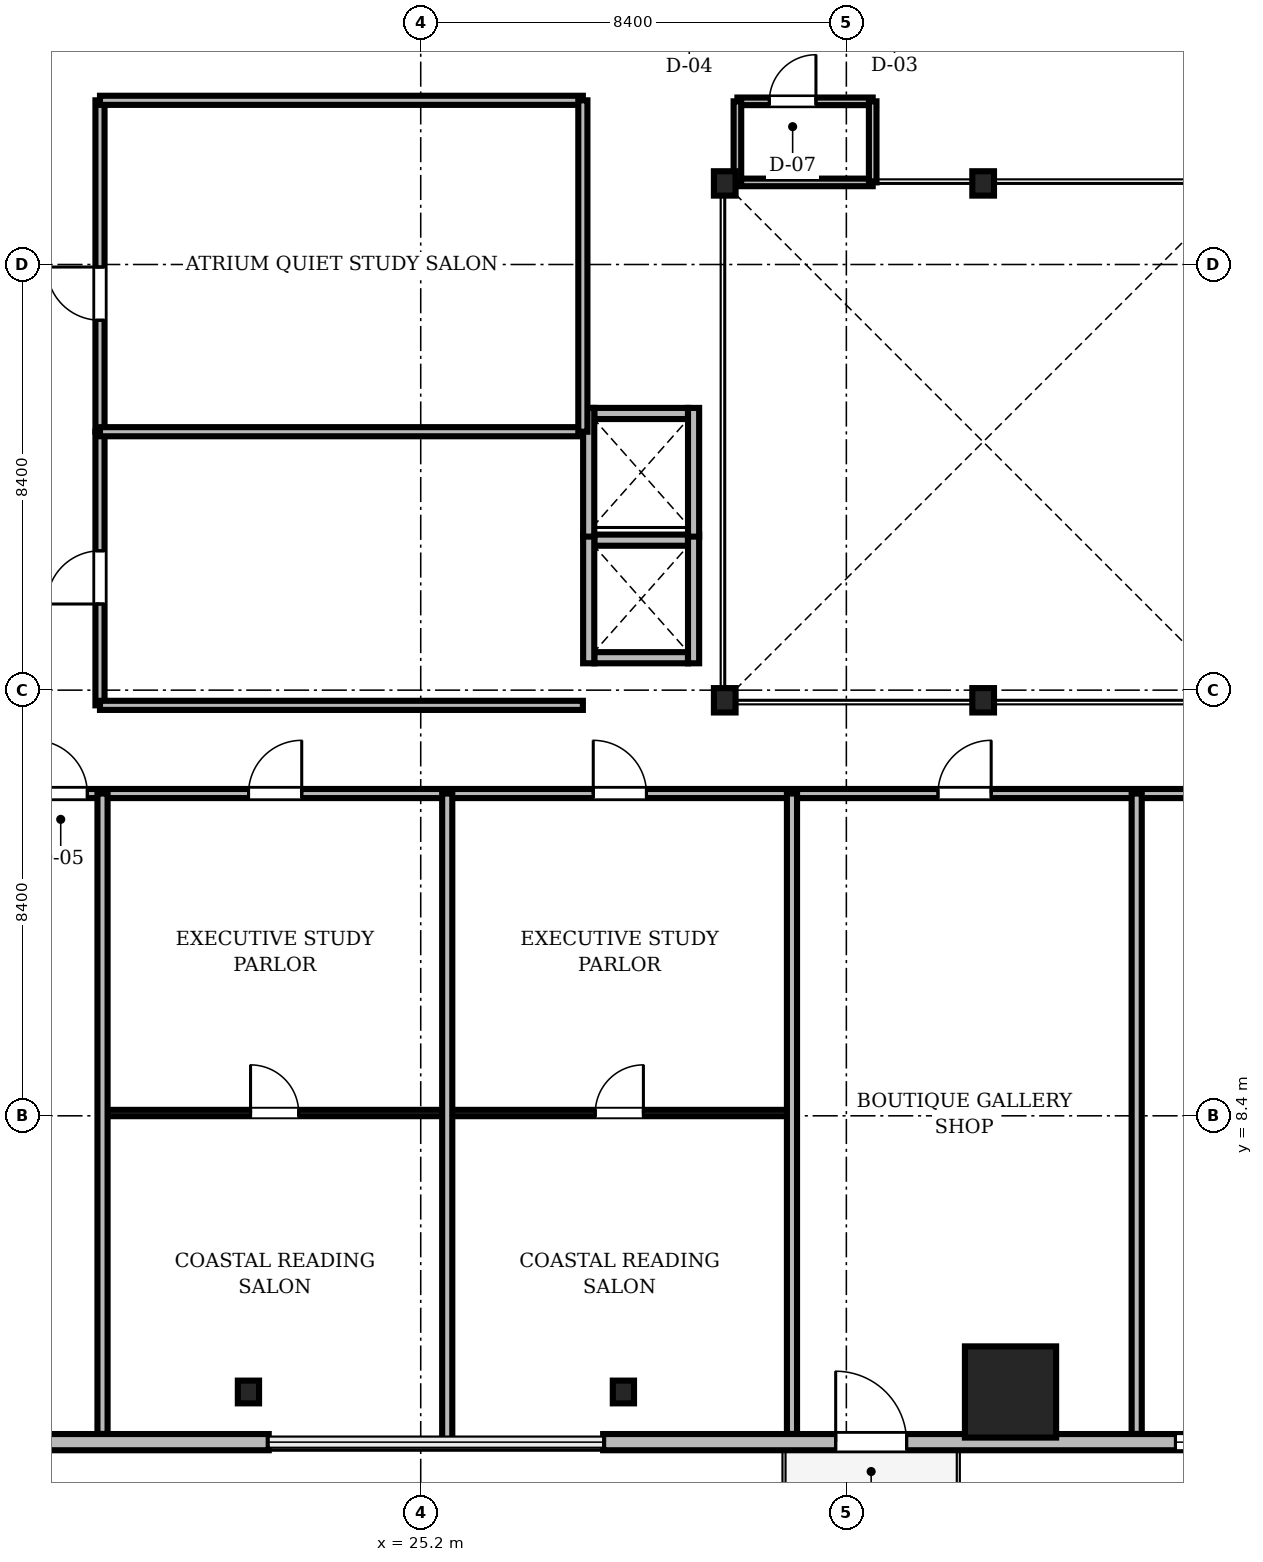
"""IFC4 building model, lengths in metres.
Left out: names, types, materials, properties, quantities, classifications, styles, units other than length and angle.
Written with IfcOpenShell. Run it as: python <this file> out.ifc"""

import sys

from ifc_helpers import new_model, si_unit, direction, frame, frame_2d, origin, origin_2d, place, context, subcontext, project, spatial, rectangle, i_section, extrude, source, transform, mapped, element, fill, save


model = new_model("IFC4")
c1 = context("Model", 3, precision=1e-05, world=origin(), true_north=direction((0.0, 1.0)))
c2 = subcontext(c1, "Body", "Model", "MODEL_VIEW")
j1 = project(units=[si_unit("LENGTHUNIT", "METRE"), si_unit("PLANEANGLEUNIT", "RADIAN")], contexts=[c1])
p1 = place(None, origin())
s1 = spatial("IfcSite", under=j1, at=p1, CompositionType="ELEMENT")
p2 = place(p1, origin())
s2 = spatial("IfcBuilding", under=s1, at=p2, CompositionType="ELEMENT")
p3 = place(p2, frame((0.0, 0.0, 75.05)))
s3 = spatial("IfcBuildingStorey", under=s2, at=p3, CompositionType="ELEMENT", Elevation=75.05)
m1 = source(origin(), c2, "Body", "SweptSolid", [
    extrude(i_section(OverallWidth=0.428, OverallDepth=0.481, WebThickness=0.04, FlangeThickness=0.063, FilletRadius=0.015, at=origin_2d()), origin(), (0.0, 0.0, 1.0), 3.41),
])
for number, where, z_axis, x_axis in (
    (1, (31.2, 16.6, 0.0), (0.0, 0.0, 1.0), (1.0, 0.0, 0.0)),
    (2, (36.3, 16.6, 0.0), (0.0, 0.0, 1.0), (1.0, 0.0, 0.0)),
    (3, (36.3, 26.8, 0.0), (0.0, 0.0, 1.0), (1.0, 0.0, 0.0)),
    (4, (31.2, 26.8, 0.0), (0.0, 0.0, 1.0), (1.0, 0.0, 0.0)),
):
    element("IfcColumn", number, at=place(p3, frame(where, z_axis=z_axis, x_axis=x_axis)), inside=s3, PredefinedType="COLUMN", context=c2, shape_type="MappedRepresentation", body=[
        mapped(m1, transform((0.0, 0.0, 0.0), scale=1.0)),
    ])
m2 = source(origin(), c2, "Body", "SweptSolid", [
    extrude(rectangle(XDim=1.8, YDim=1.8, at=origin_2d()), origin(), (0.0, 0.0, 1.0), 3.41),
])
p4 = place(p3, frame((36.84, 2.95, 0.0), z_axis=(0.0, 0.0, 1.0), x_axis=(1.0, 0.0, 0.0)))
e5 = element("IfcColumn", 5, at=p4, inside=s3, PredefinedType="COLUMN", context=c2, shape_type="MappedRepresentation", body=[
    mapped(m2, transform((0.0, 0.0, 0.0), scale=1.0)),
])
m3 = source(origin(), c2, "Body", "SweptSolid", [
    extrude(i_section(OverallWidth=0.419, OverallDepth=0.449, WebThickness=0.031, FlangeThickness=0.048, FilletRadius=0.015, at=origin_2d()), origin(), (0.0, 0.0, 1.0), 3.41),
])
for number, where, z_axis, x_axis in (
    (6, (21.8, 2.95, 0.0), (0.0, 0.0, 1.0), (1.0, 0.0, 0.0)),
    (7, (29.2, 2.95, 0.0), (0.0, 0.0, 1.0), (1.0, 0.0, 0.0)),
):
    element("IfcColumn", number, at=place(p3, frame(where, z_axis=z_axis, x_axis=x_axis)), inside=s3, PredefinedType="COLUMN", context=c2, shape_type="MappedRepresentation", body=[
        mapped(m3, transform((0.0, 0.0, 0.0), scale=1.0)),
    ])
m4 = source(origin(), c2, "Body", "SweptSolid", [
    extrude(rectangle(XDim=15.6, YDim=0.32, at=frame_2d((7.8, 0.0))), origin(), (0.0, 0.0, 1.0), 3.41),
])
p5 = place(p3, frame((6.6, 1.96, 0.0), z_axis=(0.0, 0.0, 1.0), x_axis=(1.0, 0.0, 0.0)))
e8 = element("IfcWall", 8, at=p5, inside=s3, PredefinedType="SOLIDWALL", context=c2, shape_type="MappedRepresentation", body=[
    mapped(m4, transform((0.0, 0.0, 0.0), scale=1.0)),
])
m5 = source(origin(), c2, "Body", "SweptSolid", [
    extrude(rectangle(XDim=2.2, YDim=2.4, at=frame_2d((1.1, 1.2))), frame((0.0, 0.17, 0.0), z_axis=(0.0, -1.0, 0.0), x_axis=(1.0, 0.0, 0.0)), (0.0, 0.0, 1.0), 0.34),
])
p6 = place(p5, frame((3.005, 0.0, 0.72)))
e9 = element("IfcOpeningElement", 9, at=p6, cuts=e8, PredefinedType="OPENING", context=c2, shape_type="MappedRepresentation", body=[
    mapped(m5, transform((0.0, 0.0, 0.0), scale=1.0)),
])
p7 = place(p3, frame((28.8, 1.96, 0.0), z_axis=(0.0, 0.0, 1.0), x_axis=(1.0, 0.0, 0.0)))
e10 = element("IfcWall", 10, at=p7, inside=s3, PredefinedType="SOLIDWALL", context=c2, shape_type="MappedRepresentation", body=[
    mapped(m4, transform((0.0, 0.0, 0.0), scale=1.0)),
])
m6 = source(origin(), c2, "Body", "SweptSolid", [
    extrude(rectangle(XDim=1.4, YDim=2.3, at=frame_2d((0.7, 1.15))), frame((0.0, 0.17, 0.0), z_axis=(0.0, -1.0, 0.0), x_axis=(1.0, 0.0, 0.0)), (0.0, 0.0, 1.0), 0.34),
])
p8 = place(p7, frame((4.59, 0.0, 0.0)))
e11 = element("IfcOpeningElement", 11, at=p8, cuts=e10, PredefinedType="OPENING", context=c2, shape_type="MappedRepresentation", body=[
    mapped(m6, transform((0.0, 0.0, 0.0), scale=1.0)),
])
p9 = place(p7, frame((11.295, 0.0, 0.72)))
e12 = element("IfcOpeningElement", 12, at=p9, cuts=e10, PredefinedType="OPENING", context=c2, shape_type="MappedRepresentation", body=[
    mapped(m5, transform((0.0, 0.0, 0.0), scale=1.0)),
])
m7 = source(origin(), c2, "Body", "SweptSolid", [
    extrude(rectangle(XDim=1.85, YDim=0.22, at=frame_2d((0.925, 0.0))), origin(), (0.0, 0.0, 1.0), 3.41),
])
for number, where, z_axis, x_axis in (
    (13, (28.625, 17.44, 0.0), (0.0, 0.0, 1.0), (1.0, 0.0, 0.0)),
    (14, (28.625, 19.76, 0.0), (0.0, 0.0, 1.0), (1.0, 0.0, 0.0)),
):
    element("IfcWall", number, at=place(p3, frame(where, z_axis=z_axis, x_axis=x_axis)), inside=s3, PredefinedType="SOLIDWALL", context=c2, shape_type="MappedRepresentation", body=[
        mapped(m7, transform((0.0, 0.0, 0.0), scale=1.0)),
    ])
m8 = source(origin(), c2, "Body", "SweptSolid", [
    extrude(rectangle(XDim=2.54, YDim=0.22, at=frame_2d((1.27, 0.0))), origin(), (0.0, 0.0, 1.0), 3.41),
])
for number, where, z_axis, x_axis in (
    (15, (28.515, 17.33, 0.0), (0.0, 0.0, 1.0), (0.0, 1.0, 0.0)),
    (16, (30.585, 17.33, 0.0), (0.0, 0.0, 1.0), (0.0, 1.0, 0.0)),
):
    element("IfcWall", number, at=place(p3, frame(where, z_axis=z_axis, x_axis=x_axis)), inside=s3, PredefinedType="SOLIDWALL", context=c2, shape_type="MappedRepresentation", body=[
        mapped(m8, transform((0.0, 0.0, 0.0), scale=1.0)),
    ])
p10 = place(p3, frame((28.625, 22.26, 0.0), z_axis=(0.0, 0.0, 1.0), x_axis=(1.0, 0.0, 0.0)))
e17 = element("IfcWall", 17, at=p10, inside=s3, PredefinedType="SOLIDWALL", context=c2, shape_type="MappedRepresentation", body=[
    mapped(m7, transform((0.0, 0.0, 0.0), scale=1.0)),
])
for number, where, z_axis, x_axis in (
    (18, (28.515, 19.83, 0.0), (0.0, 0.0, 1.0), (0.0, 1.0, 0.0)),
    (19, (30.585, 19.83, 0.0), (0.0, 0.0, 1.0), (0.0, 1.0, 0.0)),
):
    element("IfcWall", number, at=place(p3, frame(where, z_axis=z_axis, x_axis=x_axis)), inside=s3, PredefinedType="SOLIDWALL", context=c2, shape_type="MappedRepresentation", body=[
        mapped(m8, transform((0.0, 0.0, 0.0), scale=1.0)),
    ])
m9 = source(origin(), c2, "Body", "SweptSolid", [
    extrude(rectangle(XDim=46.156, YDim=0.18, at=frame_2d((23.078, 0.0))), origin(), (0.0, 0.0, 1.0), 2.652),
])
p11 = place(p3, frame((2.422, 14.76, 0.0), z_axis=(0.0, 0.0, 1.0), x_axis=(1.0, 0.0, 0.0)))
e20 = element("IfcWall", 20, at=p11, inside=s3, PredefinedType="PARTITIONING", context=c2, shape_type="MappedRepresentation", body=[
    mapped(m9, transform((0.0, 0.0, 0.0), scale=1.0)),
])
m10 = source(origin(), c2, "Body", "SweptSolid", [
    extrude(rectangle(XDim=1.05, YDim=2.2, at=frame_2d((0.525, 1.1))), frame((0.0, 0.1, 0.0), z_axis=(0.0, -1.0, 0.0), x_axis=(1.0, 0.0, 0.0)), (0.0, 0.0, 1.0), 0.2),
])
p12 = place(p11, frame((15.148, 0.0, 0.0)))
e21 = element("IfcOpeningElement", 21, at=p12, cuts=e20, PredefinedType="OPENING", context=c2, shape_type="MappedRepresentation", body=[
    mapped(m10, transform((0.0, 0.0, 0.0), scale=1.0)),
])
p13 = place(p11, frame((19.38, 0.0, 0.0)))
e22 = element("IfcOpeningElement", 22, at=p13, cuts=e20, PredefinedType="OPENING", context=c2, shape_type="MappedRepresentation", body=[
    mapped(m10, transform((0.0, 0.0, 0.0), scale=1.0)),
])
p14 = place(p11, frame((26.183, 0.0, 0.0)))
e23 = element("IfcOpeningElement", 23, at=p14, cuts=e20, PredefinedType="OPENING", context=c2, shape_type="MappedRepresentation", body=[
    mapped(m10, transform((0.0, 0.0, 0.0), scale=1.0)),
])
p15 = place(p11, frame((32.986, 0.0, 0.0)))
e24 = element("IfcOpeningElement", 24, at=p15, cuts=e20, PredefinedType="OPENING", context=c2, shape_type="MappedRepresentation", body=[
    mapped(m10, transform((0.0, 0.0, 0.0), scale=1.0)),
])
p16 = place(p11, frame((40.998, 0.0, 0.0)))
e25 = element("IfcOpeningElement", 25, at=p16, cuts=e20, PredefinedType="OPENING", context=c2, shape_type="MappedRepresentation", body=[
    mapped(m10, transform((0.0, 0.0, 0.0), scale=1.0)),
])
m11 = source(origin(), c2, "Body", "SweptSolid", [
    extrude(rectangle(XDim=6.804, YDim=0.125, at=frame_2d((3.402, 0.0))), origin(), (0.0, 0.0, 1.0), 2.802),
])
p17 = place(p3, frame((25.723, 8.455, 0.0), z_axis=(0.0, 0.0, 1.0), x_axis=(1.0, 0.0, 0.0)))
e26 = element("IfcWall", 26, at=p17, inside=s3, PredefinedType="PARTITIONING", context=c2, shape_type="MappedRepresentation", body=[
    mapped(m11, transform((0.0, 0.0, 0.0), scale=1.0)),
])
m12 = source(origin(), c2, "Body", "SweptSolid", [
    extrude(rectangle(XDim=0.95, YDim=2.15, at=frame_2d((0.475, 1.075))), frame((0.0, 0.073, 0.0), z_axis=(0.0, -1.0, 0.0), x_axis=(1.0, 0.0, 0.0)), (0.0, 0.0, 1.0), 0.145),
])
p18 = place(p17, frame((2.922, 0.0, 0.0)))
e27 = element("IfcOpeningElement", 27, at=p18, cuts=e26, PredefinedType="OPENING", context=c2, shape_type="MappedRepresentation", body=[
    mapped(m12, transform((0.0, 0.0, 0.0), scale=1.0)),
])
m13 = source(origin(), c2, "Body", "SweptSolid", [
    extrude(rectangle(XDim=6.803, YDim=0.125, at=frame_2d((3.401, 0.0))), origin(), (0.0, 0.0, 1.0), 2.802),
])
p19 = place(p3, frame((18.92, 8.455, 0.0), z_axis=(0.0, 0.0, 1.0), x_axis=(1.0, 0.0, 0.0)))
e28 = element("IfcWall", 28, at=p19, inside=s3, PredefinedType="PARTITIONING", context=c2, shape_type="MappedRepresentation", body=[
    mapped(m13, transform((0.0, 0.0, 0.0), scale=1.0)),
])
p20 = place(p19, frame((2.922, 0.0, 0.0)))
e29 = element("IfcOpeningElement", 29, at=p20, cuts=e28, PredefinedType="OPENING", context=c2, shape_type="MappedRepresentation", body=[
    mapped(m12, transform((0.0, 0.0, 0.0), scale=1.0)),
])
m14 = source(origin(), c2, "Body", "SweptSolid", [
    extrude(rectangle(XDim=6.54, YDim=0.18, at=frame_2d((3.27, 0.0))), origin(), (0.0, 0.0, 1.0), 2.802),
])
p21 = place(p3, frame((18.87, 21.9, 0.0), z_axis=(0.0, 0.0, 1.0), x_axis=(0.0, 1.0, 0.0)))
e30 = element("IfcWall", 30, at=p21, inside=s3, PredefinedType="PARTITIONING", context=c2, shape_type="MappedRepresentation", body=[
    mapped(m14, transform((0.0, 0.0, 0.0), scale=1.0)),
])
p22 = place(p21, frame((2.2, 0.0, 0.0)))
e31 = element("IfcOpeningElement", 31, at=p22, cuts=e30, PredefinedType="OPENING", context=c2, shape_type="MappedRepresentation", body=[
    mapped(m10, transform((0.0, 0.0, 0.0), scale=1.0)),
])
m15 = source(origin(), c2, "Body", "SweptSolid", [
    extrude(rectangle(XDim=5.4, YDim=0.18, at=frame_2d((2.7, 0.0))), origin(), (0.0, 0.0, 1.0), 2.802),
])
p23 = place(p3, frame((18.87, 16.5, 0.0), z_axis=(0.0, 0.0, 1.0), x_axis=(0.0, 1.0, 0.0)))
e32 = element("IfcWall", 32, at=p23, inside=s3, PredefinedType="PARTITIONING", context=c2, shape_type="MappedRepresentation", body=[
    mapped(m15, transform((0.0, 0.0, 0.0), scale=1.0)),
])
p24 = place(p23, frame((2.0, 0.0, 0.0)))
e33 = element("IfcOpeningElement", 33, at=p24, cuts=e32, PredefinedType="OPENING", context=c2, shape_type="MappedRepresentation", body=[
    mapped(m10, transform((0.0, 0.0, 0.0), scale=1.0)),
])
m16 = source(origin(), c2, "Body", "SweptSolid", [
    extrude(rectangle(XDim=2.67, YDim=0.15, at=frame_2d((1.335, 0.0))), origin(), (0.0, 0.0, 1.0), 3.042),
])
p25 = place(p3, frame((31.45, 28.42, 0.0), z_axis=(0.0, 0.0, 1.0), x_axis=(1.0, 0.0, 0.0)))
e34 = element("IfcWall", 34, at=p25, inside=s3, PredefinedType="PARTITIONING", context=c2, shape_type="MappedRepresentation", body=[
    mapped(m16, transform((0.0, 0.0, 0.0), scale=1.0)),
])
m17 = source(origin(), c2, "Body", "SweptSolid", [
    extrude(rectangle(XDim=0.92, YDim=2.1, at=frame_2d((0.46, 1.05))), frame((0.0, 0.085, 0.0), z_axis=(0.0, -1.0, 0.0), x_axis=(1.0, 0.0, 0.0)), (0.0, 0.0, 1.0), 0.17),
])
p26 = place(p25, frame((0.63, 0.0, 0.0)))
e35 = element("IfcOpeningElement", 35, at=p26, cuts=e34, PredefinedType="OPENING", context=c2, shape_type="MappedRepresentation", body=[
    mapped(m17, transform((0.0, 0.0, 0.0), scale=1.0)),
])
m18 = source(origin(), c2, "Body", "SweptSolid", [
    extrude(rectangle(XDim=12.638, YDim=0.2, at=frame_2d((6.319, 0.0))), origin(), (0.0, 0.0, 1.0), 2.652),
])
p27 = place(p3, frame((18.92, 2.122, 0.0), z_axis=(0.0, 0.0, 1.0), x_axis=(0.0, 1.0, 0.0)))
e36 = element("IfcWall", 36, at=p27, inside=s3, PredefinedType="PARTITIONING", context=c2, shape_type="MappedRepresentation", body=[
    mapped(m18, transform((0.0, 0.0, 0.0), scale=1.0)),
])
m19 = source(origin(), c2, "Body", "SweptSolid", [
    extrude(rectangle(XDim=12.83, YDim=0.2, at=frame_2d((6.415, 0.0))), origin(), (0.0, 0.0, 1.0), 2.652),
])
p28 = place(p3, frame((25.723, 1.93, 0.0), z_axis=(0.0, 0.0, 1.0), x_axis=(0.0, 1.0, 0.0)))
e37 = element("IfcWall", 37, at=p28, inside=s3, PredefinedType="PARTITIONING", context=c2, shape_type="MappedRepresentation", body=[
    mapped(m19, transform((0.0, 0.0, 0.0), scale=1.0)),
])
for number, where, z_axis, x_axis in (
    (38, (32.527, 2.122, 0.0), (0.0, 0.0, 1.0), (0.0, 1.0, 0.0)),
    (39, (39.33, 2.122, 0.0), (0.0, 0.0, 1.0), (0.0, 1.0, 0.0)),
):
    element("IfcWall", number, at=place(p3, frame(where, z_axis=z_axis, x_axis=x_axis)), inside=s3, PredefinedType="PARTITIONING", context=c2, shape_type="MappedRepresentation", body=[
        mapped(m18, transform((0.0, 0.0, 0.0), scale=1.0)),
    ])
m20 = source(origin(), c2, "Body", "SweptSolid", [
    extrude(rectangle(XDim=9.53, YDim=0.18, at=frame_2d((4.765, 0.0))), origin(), (0.0, 0.0, 1.0), 2.802),
])
p29 = place(p3, frame((18.87, 16.5, 0.0), z_axis=(0.0, 0.0, 1.0), x_axis=(1.0, 0.0, 0.0)))
e40 = element("IfcWall", 40, at=p29, inside=s3, PredefinedType="PARTITIONING", context=c2, shape_type="MappedRepresentation", body=[
    mapped(m20, transform((0.0, 0.0, 0.0), scale=1.0)),
])
m21 = source(origin(), c2, "Body", "SweptSolid", [
    extrude(rectangle(XDim=9.53, YDim=0.18, at=frame_2d((4.765, 0.0))), origin(), (0.0, 0.0, 1.0), 3.41),
])
for number, where, z_axis, x_axis in (
    (41, (18.87, 21.9, 0.0), (0.0, 0.0, 1.0), (1.0, 0.0, 0.0)),
    (42, (18.87, 28.44, 0.0), (0.0, 0.0, 1.0), (1.0, 0.0, 0.0)),
):
    element("IfcWall", number, at=place(p3, frame(where, z_axis=z_axis, x_axis=x_axis)), inside=s3, PredefinedType="PARTITIONING", context=c2, shape_type="MappedRepresentation", body=[
        mapped(m21, transform((0.0, 0.0, 0.0), scale=1.0)),
    ])
p30 = place(p3, frame((28.4, 21.9, 0.0), z_axis=(0.0, 0.0, 1.0), x_axis=(0.0, 1.0, 0.0)))
e43 = element("IfcWall", 43, at=p30, inside=s3, PredefinedType="PARTITIONING", context=c2, shape_type="MappedRepresentation", body=[
    mapped(m14, transform((0.0, 0.0, 0.0), scale=1.0)),
])
m22 = source(origin(), c2, "Body", "SweptSolid", [
    extrude(rectangle(XDim=2.67, YDim=0.15, at=frame_2d((1.335, 0.0))), origin(), (0.0, 0.0, 1.0), 2.952),
])
p31 = place(p3, frame((31.45, 26.82, 0.0), z_axis=(0.0, 0.0, 1.0), x_axis=(1.0, 0.0, 0.0)))
e44 = element("IfcWall", 44, at=p31, inside=s3, PredefinedType="PARTITIONING", context=c2, shape_type="MappedRepresentation", body=[
    mapped(m22, transform((0.0, 0.0, 0.0), scale=1.0)),
])
m23 = source(origin(), c2, "Body", "SweptSolid", [
    extrude(rectangle(XDim=1.6, YDim=0.15, at=frame_2d((0.8, 0.0))), origin(), (0.0, 0.0, 1.0), 2.952),
])
for number, where, z_axis, x_axis in (
    (45, (31.45, 26.82, 0.0), (0.0, 0.0, 1.0), (0.0, 1.0, 0.0)),
    (46, (34.12, 26.82, 0.0), (0.0, 0.0, 1.0), (0.0, 1.0, 0.0)),
):
    element("IfcWall", number, at=place(p3, frame(where, z_axis=z_axis, x_axis=x_axis)), inside=s3, PredefinedType="PARTITIONING", context=c2, shape_type="MappedRepresentation", body=[
        mapped(m23, transform((0.0, 0.0, 0.0), scale=1.0)),
    ])
m24 = source(origin(), c2, "Body", "SweptSolid", [
    extrude(rectangle(XDim=1.4, YDim=2.3, at=frame_2d((0.7, 1.15))), frame((0.0, 0.025, 0.0), z_axis=(0.0, -1.0, 0.0), x_axis=(1.0, 0.0, 0.0)), (0.0, 0.0, 1.0), 0.05),
])
p32 = place(p8, frame((1.4, 0.0, 0.0), z_axis=(0.0, 0.0, 1.0), x_axis=(-1.0, 0.0, 0.0)))
e47 = element("IfcDoor", 47, at=p32, inside=s3, OperationType="DOUBLE_DOOR_SLIDING", PredefinedType="DOOR", context=c2, shape_type="MappedRepresentation", body=[
    mapped(m24, transform((0.0, 0.0, 0.0), scale=1.0)),
])
fill(e11, e47)
m25 = source(origin(), c2, "Body", "SweptSolid", [
    extrude(rectangle(XDim=2.2, YDim=2.4, at=frame_2d((1.1, 1.2))), frame((0.0, 0.03, 0.0), z_axis=(0.0, -1.0, 0.0), x_axis=(1.0, 0.0, 0.0)), (0.0, 0.0, 1.0), 0.06),
])
p33 = place(p9, origin())
e48 = element("IfcWindow", 48, at=p33, inside=s3, PartitioningType="SINGLE_PANEL", PredefinedType="WINDOW", context=c2, shape_type="MappedRepresentation", body=[
    mapped(m25, transform((0.0, 0.0, 0.0), scale=1.0)),
])
fill(e12, e48)
m26 = source(origin(), c2, "Body", "SweptSolid", [
    extrude(rectangle(XDim=1.05, YDim=2.2, at=frame_2d((0.525, 1.1))), frame((0.0, 0.025, 0.0), z_axis=(0.0, -1.0, 0.0), x_axis=(1.0, 0.0, 0.0)), (0.0, 0.0, 1.0), 0.05),
])
p34 = place(p12, origin())
e49 = element("IfcDoor", 49, at=p34, inside=s3, OperationType="SINGLE_SWING_LEFT", PredefinedType="DOOR", context=c2, shape_type="MappedRepresentation", body=[
    mapped(m26, transform((0.0, 0.0, 0.0), scale=1.0)),
])
fill(e21, e49)
p35 = place(p13, origin())
e50 = element("IfcDoor", 50, at=p35, inside=s3, OperationType="SINGLE_SWING_RIGHT", PredefinedType="DOOR", context=c2, shape_type="MappedRepresentation", body=[
    mapped(m26, transform((0.0, 0.0, 0.0), scale=1.0)),
])
fill(e22, e50)
p36 = place(p14, origin())
e51 = element("IfcDoor", 51, at=p36, inside=s3, OperationType="SINGLE_SWING_LEFT", PredefinedType="DOOR", context=c2, shape_type="MappedRepresentation", body=[
    mapped(m26, transform((0.0, 0.0, 0.0), scale=1.0)),
])
fill(e23, e51)
p37 = place(p15, origin())
e52 = element("IfcDoor", 52, at=p37, inside=s3, OperationType="SINGLE_SWING_RIGHT", PredefinedType="DOOR", context=c2, shape_type="MappedRepresentation", body=[
    mapped(m26, transform((0.0, 0.0, 0.0), scale=1.0)),
])
fill(e24, e52)
m27 = source(origin(), c2, "Body", "SweptSolid", [
    extrude(rectangle(XDim=0.95, YDim=2.15, at=frame_2d((0.475, 1.075))), frame((0.0, 0.025, 0.0), z_axis=(0.0, -1.0, 0.0), x_axis=(1.0, 0.0, 0.0)), (0.0, 0.0, 1.0), 0.05),
])
p38 = place(p18, origin())
e53 = element("IfcDoor", 53, at=p38, inside=s3, OperationType="SINGLE_SWING_RIGHT", PredefinedType="DOOR", context=c2, shape_type="MappedRepresentation", body=[
    mapped(m27, transform((0.0, 0.0, 0.0), scale=1.0)),
])
fill(e27, e53)
p39 = place(p20, origin())
e54 = element("IfcDoor", 54, at=p39, inside=s3, OperationType="SINGLE_SWING_LEFT", PredefinedType="DOOR", context=c2, shape_type="MappedRepresentation", body=[
    mapped(m27, transform((0.0, 0.0, 0.0), scale=1.0)),
])
fill(e29, e54)
p40 = place(p22, origin())
e55 = element("IfcDoor", 55, at=p40, inside=s3, OperationType="SINGLE_SWING_RIGHT", PredefinedType="DOOR", context=c2, shape_type="MappedRepresentation", body=[
    mapped(m26, transform((0.0, 0.0, 0.0), scale=1.0)),
])
fill(e31, e55)
p41 = place(p24, origin())
e56 = element("IfcDoor", 56, at=p41, inside=s3, OperationType="SINGLE_SWING_LEFT", PredefinedType="DOOR", context=c2, shape_type="MappedRepresentation", body=[
    mapped(m26, transform((0.0, 0.0, 0.0), scale=1.0)),
])
fill(e33, e56)
m28 = source(origin(), c2, "Body", "SweptSolid", [
    extrude(rectangle(XDim=0.92, YDim=2.1, at=frame_2d((0.46, 1.05))), frame((0.0, 0.025, 0.0), z_axis=(0.0, -1.0, 0.0), x_axis=(1.0, 0.0, 0.0)), (0.0, 0.0, 1.0), 0.05),
])
p42 = place(p26, origin())
e57 = element("IfcDoor", 57, at=p42, inside=s3, OperationType="SINGLE_SWING_RIGHT", PredefinedType="DOOR", context=c2, shape_type="MappedRepresentation", body=[
    mapped(m28, transform((0.0, 0.0, 0.0), scale=1.0)),
])
fill(e35, e57)
save(model, sys.argv[1])
